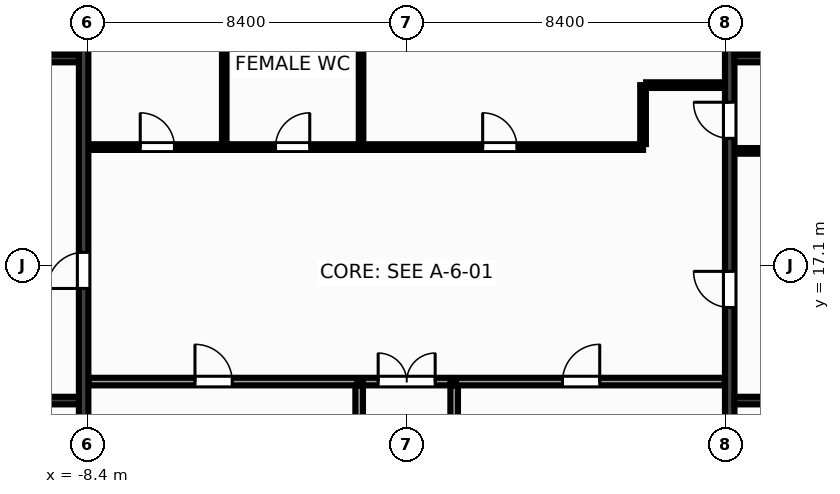
"""IFC4 building model, lengths in metres.
Left out: names, types, materials, properties, quantities, classifications, styles, units other than length and angle.
Written with IfcOpenShell. Run it as: python <this file> out.ifc"""

import sys

from ifc_helpers import new_model, si_unit, direction, frame, frame_2d, origin, place, context, subcontext, project, spatial, rectangle, extrude, source, transform, mapped, element, fill, save


model = new_model("IFC4")
c1 = context("Model", 3, precision=1e-05, world=origin(), true_north=direction((0.0, 1.0)))
c2 = subcontext(c1, "Body", "Model", "MODEL_VIEW")
j1 = project(units=[si_unit("LENGTHUNIT", "METRE"), si_unit("PLANEANGLEUNIT", "RADIAN")], contexts=[c1])
p1 = place(None, origin())
s1 = spatial("IfcSite", under=j1, at=p1, CompositionType="ELEMENT")
p2 = place(p1, origin())
s2 = spatial("IfcBuilding", under=s1, at=p2, CompositionType="ELEMENT")
p3 = place(p2, frame((0.0, 0.0, -11.0)))
s3 = spatial("IfcBuildingStorey", under=s2, at=p3, CompositionType="ELEMENT", Elevation=-11.0)
m1 = source(origin(), c2, "Body", "SweptSolid", [
    extrude(rectangle(XDim=12.8, YDim=0.25, at=frame_2d((6.4, 0.0))), origin(), (0.0, 0.0, 1.0), 5.5),
])
p4 = place(p3, frame((-8.5, 10.6, 0.0), z_axis=(0.0, 0.0, 1.0), x_axis=(0.0, 1.0, 0.0)))
e1 = element("IfcWall", 1, at=p4, inside=s3, PredefinedType="SHEAR", context=c2, shape_type="MappedRepresentation", body=[
    mapped(m1, transform((0.0, 0.0, 0.0), x_axis=(1.0, 0.0, 0.0), y_axis=(0.0, 1.0, 0.0), z_axis=(0.0, 0.0, 1.0), scale=1.0)),
])
p5 = place(p4, frame((5.9, 0.0, 0.0)))
e2 = element("IfcOpeningElement", 2, at=p5, cuts=e1, PredefinedType="OPENING", context=c2, shape_type="SweptSolid", body=[
    extrude(rectangle(XDim=0.95, YDim=2.15, at=frame_2d((0.475, 1.075))), frame((0.0, 0.137, 0.0), z_axis=(0.0, -1.0, 0.0), x_axis=(1.0, 0.0, 0.0)), (0.0, 0.0, 1.0), 0.274),
])
p6 = place(p3, frame((8.5, 10.6, 0.0), z_axis=(0.0, 0.0, 1.0), x_axis=(0.0, 1.0, 0.0)))
e3 = element("IfcWall", 3, at=p6, inside=s3, PredefinedType="SHEAR", context=c2, shape_type="MappedRepresentation", body=[
    mapped(m1, transform((0.0, 0.0, 0.0), x_axis=(1.0, 0.0, 0.0), y_axis=(0.0, 1.0, 0.0), z_axis=(0.0, 0.0, 1.0), scale=1.0)),
])
p7 = place(p6, frame((5.4, 0.0, 0.0)))
e4 = element("IfcOpeningElement", 4, at=p7, cuts=e3, PredefinedType="OPENING", context=c2, shape_type="SweptSolid", body=[
    extrude(rectangle(XDim=0.95, YDim=2.15, at=frame_2d((0.475, 1.075))), frame((0.0, 0.137, 0.0), z_axis=(0.0, -1.0, 0.0), x_axis=(1.0, 0.0, 0.0)), (0.0, 0.0, 1.0), 0.274),
])
p8 = place(p6, frame((9.85, 0.0, 0.0)))
e5 = element("IfcOpeningElement", 5, at=p8, cuts=e3, PredefinedType="OPENING", context=c2, shape_type="SweptSolid", body=[
    extrude(rectangle(XDim=0.95, YDim=2.15, at=frame_2d((0.475, 1.075))), frame((0.0, 0.137, 0.0), z_axis=(0.0, -1.0, 0.0), x_axis=(1.0, 0.0, 0.0)), (0.0, 0.0, 1.0), 0.274),
])
m2 = source(origin(), c2, "Body", "SweptSolid", [
    extrude(rectangle(XDim=2.825, YDim=0.2, at=frame_2d((1.413, 0.0))), origin(), (0.0, 0.0, 1.0), 5.5),
])
for number, where, z_axis, x_axis in (
    (6, (-11.45, 13.55, 0.0), (0.0, 0.0, 1.0), (1.0, 0.0, 0.0)),
    (7, (8.625, 13.55, 0.0), (0.0, 0.0, 1.0), (1.0, 0.0, 0.0)),
):
    element("IfcWall", number, at=place(p3, frame(where, z_axis=z_axis, x_axis=x_axis)), inside=s3, PredefinedType="SHEAR", context=c2, shape_type="MappedRepresentation", body=[
        mapped(m2, transform((0.0, 0.0, 0.0), x_axis=(1.0, 0.0, 0.0), y_axis=(0.0, 1.0, 0.0), z_axis=(0.0, 0.0, 1.0), scale=1.0)),
    ])
m3 = source(origin(), c2, "Body", "SweptSolid", [
    extrude(rectangle(XDim=3.02, YDim=0.2, at=frame_2d((1.51, 0.0))), origin(), (0.0, 0.0, 1.0), 5.5),
])
for number, where, z_axis, x_axis in (
    (8, (-11.645, 22.55, 0.0), (0.0, 0.0, 1.0), (1.0, 0.0, 0.0)),
    (9, (8.625, 22.55, 0.0), (0.0, 0.0, 1.0), (1.0, 0.0, 0.0)),
):
    element("IfcWall", number, at=place(p3, frame(where, z_axis=z_axis, x_axis=x_axis)), inside=s3, PredefinedType="SHEAR", context=c2, shape_type="MappedRepresentation", body=[
        mapped(m3, transform((0.0, 0.0, 0.0), x_axis=(1.0, 0.0, 0.0), y_axis=(0.0, 1.0, 0.0), z_axis=(0.0, 0.0, 1.0), scale=1.0)),
    ])
m4 = source(origin(), c2, "Body", "SweptSolid", [
    extrude(rectangle(XDim=3.01, YDim=0.15, at=frame_2d((1.505, 0.0))), origin(), (0.0, 0.0, 1.0), 5.15),
])
p9 = place(p3, frame((8.63, 20.12, 0.0), z_axis=(0.0, 0.0, 1.0), x_axis=(1.0, 0.0, 0.0)))
e10 = element("IfcWall", 10, at=p9, inside=s3, PredefinedType="PARTITIONING", context=c2, shape_type="MappedRepresentation", body=[
    mapped(m4, transform((0.0, 0.0, 0.0), x_axis=(1.0, 0.0, 0.0), y_axis=(0.0, 1.0, 0.0), z_axis=(0.0, 0.0, 1.0), scale=1.0)),
])
m5 = source(origin(), c2, "Body", "SweptSolid", [
    extrude(rectangle(XDim=7.07, YDim=0.2, at=frame_2d((3.535, 0.0))), origin(), (0.0, 0.0, 1.0), 5.15),
])
p10 = place(p3, frame((-8.37, 14.05, 0.0), z_axis=(0.0, 0.0, 1.0), x_axis=(1.0, 0.0, 0.0)))
e11 = element("IfcWall", 11, at=p10, inside=s3, PredefinedType="PARTITIONING", context=c2, shape_type="MappedRepresentation", body=[
    mapped(m5, transform((0.0, 0.0, 0.0), x_axis=(1.0, 0.0, 0.0), y_axis=(0.0, 1.0, 0.0), z_axis=(0.0, 0.0, 1.0), scale=1.0)),
])
p11 = place(p10, frame((2.8, 0.0, 0.0)))
e12 = element("IfcOpeningElement", 12, at=p11, cuts=e11, PredefinedType="OPENING", context=c2, shape_type="SweptSolid", body=[
    extrude(rectangle(XDim=0.98, YDim=2.15, at=frame_2d((0.49, 1.075))), frame((0.0, 0.112, 0.0), z_axis=(0.0, -1.0, 0.0), x_axis=(1.0, 0.0, 0.0)), (0.0, 0.0, 1.0), 0.224),
])
p12 = place(p3, frame((1.3, 14.05, 0.0), z_axis=(0.0, 0.0, 1.0), x_axis=(1.0, 0.0, 0.0)))
e13 = element("IfcWall", 13, at=p12, inside=s3, PredefinedType="PARTITIONING", context=c2, shape_type="MappedRepresentation", body=[
    mapped(m5, transform((0.0, 0.0, 0.0), x_axis=(1.0, 0.0, 0.0), y_axis=(0.0, 1.0, 0.0), z_axis=(0.0, 0.0, 1.0), scale=1.0)),
])
p13 = place(p12, frame((2.8, 0.0, 0.0)))
e14 = element("IfcOpeningElement", 14, at=p13, cuts=e13, PredefinedType="OPENING", context=c2, shape_type="SweptSolid", body=[
    extrude(rectangle(XDim=0.98, YDim=2.15, at=frame_2d((0.49, 1.075))), frame((0.0, 0.112, 0.0), z_axis=(0.0, -1.0, 0.0), x_axis=(1.0, 0.0, 0.0)), (0.0, 0.0, 1.0), 0.224),
])
m6 = source(origin(), c2, "Body", "SweptSolid", [
    extrude(rectangle(XDim=3.34, YDim=0.2, at=frame_2d((1.67, 0.0))), origin(), (0.0, 0.0, 1.0), 5.15),
])
for number, where, z_axis, x_axis in (
    (15, (-1.25, 10.6, 0.0), (0.0, 0.0, 1.0), (0.0, 1.0, 0.0)),
    (16, (1.25, 10.6, 0.0), (0.0, 0.0, 1.0), (0.0, 1.0, 0.0)),
):
    element("IfcWall", number, at=place(p3, frame(where, z_axis=z_axis, x_axis=x_axis)), inside=s3, PredefinedType="PARTITIONING", context=c2, shape_type="MappedRepresentation", body=[
        mapped(m6, transform((0.0, 0.0, 0.0), x_axis=(1.0, 0.0, 0.0), y_axis=(0.0, 1.0, 0.0), z_axis=(0.0, 0.0, 1.0), scale=1.0)),
    ])
m7 = source(origin(), c2, "Body", "SweptSolid", [
    extrude(rectangle(XDim=2.3, YDim=0.2, at=frame_2d((1.15, 0.0))), origin(), (0.0, 0.0, 1.0), 5.15),
])
p14 = place(p3, frame((-1.15, 14.05, 0.0), z_axis=(0.0, 0.0, 1.0), x_axis=(1.0, 0.0, 0.0)))
e17 = element("IfcWall", 17, at=p14, inside=s3, PredefinedType="PARTITIONING", context=c2, shape_type="MappedRepresentation", body=[
    mapped(m7, transform((0.0, 0.0, 0.0), x_axis=(1.0, 0.0, 0.0), y_axis=(0.0, 1.0, 0.0), z_axis=(0.0, 0.0, 1.0), scale=1.0)),
])
p15 = place(p14, frame((0.4, 0.0, 0.0)))
e18 = element("IfcOpeningElement", 18, at=p15, cuts=e17, PredefinedType="OPENING", context=c2, shape_type="SweptSolid", body=[
    extrude(rectangle(XDim=1.5, YDim=2.2, at=frame_2d((0.75, 1.1))), frame((0.0, 0.112, 0.0), z_axis=(0.0, -1.0, 0.0), x_axis=(1.0, 0.0, 0.0)), (0.0, 0.0, 1.0), 0.224),
])
m8 = source(origin(), c2, "Body", "SweptSolid", [
    extrude(rectangle(XDim=14.59, YDim=0.15, at=frame_2d((7.295, 0.0))), origin(), (0.0, 0.0, 1.0), 5.15),
])
p16 = place(p3, frame((-8.37, 20.22, 0.0), z_axis=(0.0, 0.0, 1.0), x_axis=(1.0, 0.0, 0.0)))
e19 = element("IfcWall", 19, at=p16, inside=s3, PredefinedType="PARTITIONING", context=c2, shape_type="MappedRepresentation", body=[
    mapped(m8, transform((0.0, 0.0, 0.0), x_axis=(1.0, 0.0, 0.0), y_axis=(0.0, 1.0, 0.0), z_axis=(0.0, 0.0, 1.0), scale=1.0)),
])
p17 = place(p16, frame((1.36, 0.0, 0.0)))
e20 = element("IfcOpeningElement", 20, at=p17, cuts=e19, PredefinedType="OPENING", context=c2, shape_type="SweptSolid", body=[
    extrude(rectangle(XDim=0.9, YDim=2.15, at=frame_2d((0.45, 1.075))), frame((0.0, 0.087, 0.0), z_axis=(0.0, -1.0, 0.0), x_axis=(1.0, 0.0, 0.0)), (0.0, 0.0, 1.0), 0.174),
])
p18 = place(p16, frame((4.92, 0.0, 0.0)))
e21 = element("IfcOpeningElement", 21, at=p18, cuts=e19, PredefinedType="OPENING", context=c2, shape_type="SweptSolid", body=[
    extrude(rectangle(XDim=0.9, YDim=2.15, at=frame_2d((0.45, 1.075))), frame((0.0, 0.087, 0.0), z_axis=(0.0, -1.0, 0.0), x_axis=(1.0, 0.0, 0.0)), (0.0, 0.0, 1.0), 0.174),
])
p19 = place(p16, frame((10.37, 0.0, 0.0)))
e22 = element("IfcOpeningElement", 22, at=p19, cuts=e19, PredefinedType="OPENING", context=c2, shape_type="SweptSolid", body=[
    extrude(rectangle(XDim=0.9, YDim=2.15, at=frame_2d((0.45, 1.075))), frame((0.0, 0.087, 0.0), z_axis=(0.0, -1.0, 0.0), x_axis=(1.0, 0.0, 0.0)), (0.0, 0.0, 1.0), 0.174),
])
m9 = source(origin(), c2, "Body", "SweptSolid", [
    extrude(rectangle(XDim=1.55, YDim=0.15, at=frame_2d((0.775, 0.0))), origin(), (0.0, 0.0, 1.0), 5.15),
])
p20 = place(p3, frame((6.22, 20.3, 0.0), z_axis=(0.0, 0.0, 1.0), x_axis=(0.0, 1.0, 0.0)))
e23 = element("IfcWall", 23, at=p20, inside=s3, PredefinedType="PARTITIONING", context=c2, shape_type="MappedRepresentation", body=[
    mapped(m9, transform((0.0, 0.0, 0.0), x_axis=(1.0, 0.0, 0.0), y_axis=(0.0, 1.0, 0.0), z_axis=(0.0, 0.0, 1.0), scale=1.0)),
])
m10 = source(origin(), c2, "Body", "SweptSolid", [
    extrude(rectangle(XDim=2.07, YDim=0.15, at=frame_2d((1.035, 0.0))), origin(), (0.0, 0.0, 1.0), 5.15),
])
p21 = place(p3, frame((6.3, 21.85, 0.0), z_axis=(0.0, 0.0, 1.0), x_axis=(1.0, 0.0, 0.0)))
e24 = element("IfcWall", 24, at=p21, inside=s3, PredefinedType="PARTITIONING", context=c2, shape_type="MappedRepresentation", body=[
    mapped(m10, transform((0.0, 0.0, 0.0), x_axis=(1.0, 0.0, 0.0), y_axis=(0.0, 1.0, 0.0), z_axis=(0.0, 0.0, 1.0), scale=1.0)),
])
m11 = source(origin(), c2, "Body", "SweptSolid", [
    extrude(rectangle(XDim=3.04, YDim=0.12, at=frame_2d((1.52, 0.0))), origin(), (0.0, 0.0, 1.0), 5.15),
])
for number, where, z_axis, x_axis in (
    (25, (-4.8, 20.32, 0.0), (0.0, 0.0, 1.0), (0.0, 1.0, 0.0)),
    (26, (-1.2, 20.32, 0.0), (0.0, 0.0, 1.0), (0.0, 1.0, 0.0)),
):
    element("IfcWall", number, at=place(p3, frame(where, z_axis=z_axis, x_axis=x_axis)), inside=s3, PredefinedType="PARTITIONING", context=c2, shape_type="MappedRepresentation", body=[
        mapped(m11, transform((0.0, 0.0, 0.0), x_axis=(1.0, 0.0, 0.0), y_axis=(0.0, 1.0, 0.0), z_axis=(0.0, 0.0, 1.0), scale=1.0)),
    ])
m12 = source(origin(), c2, "Body", "SweptSolid", [
    extrude(rectangle(XDim=0.95, YDim=2.15, at=frame_2d((0.475, 1.075))), frame((0.0, 0.025, 0.0), z_axis=(0.0, -1.0, 0.0), x_axis=(1.0, 0.0, 0.0)), (0.0, 0.0, 1.0), 0.05),
])
p22 = place(p5, origin())
e27 = element("IfcDoor", 27, at=p22, inside=s3, OperationType="SINGLE_SWING_LEFT", PredefinedType="DOOR", context=c2, shape_type="MappedRepresentation", body=[
    mapped(m12, transform((0.0, 0.0, 0.0), x_axis=(1.0, 0.0, 0.0), y_axis=(0.0, 1.0, 0.0), z_axis=(0.0, 0.0, 1.0), scale=1.0)),
])
fill(e2, e27)
p23 = place(p7, origin())
e28 = element("IfcDoor", 28, at=p23, inside=s3, OperationType="SINGLE_SWING_RIGHT", PredefinedType="DOOR", context=c2, shape_type="MappedRepresentation", body=[
    mapped(m12, transform((0.0, 0.0, 0.0), x_axis=(1.0, 0.0, 0.0), y_axis=(0.0, 1.0, 0.0), z_axis=(0.0, 0.0, 1.0), scale=1.0)),
])
fill(e4, e28)
m13 = source(origin(), c2, "Body", "SweptSolid", [
    extrude(rectangle(XDim=0.95, YDim=2.15, at=frame_2d((0.475, 1.075))), frame((0.0, 0.025, 0.0), z_axis=(0.0, -1.0, 0.0), x_axis=(1.0, 0.0, 0.0)), (0.0, 0.0, 1.0), 0.05),
])
p24 = place(p8, origin())
e29 = element("IfcDoor", 29, at=p24, inside=s3, OperationType="SINGLE_SWING_RIGHT", PredefinedType="DOOR", context=c2, shape_type="MappedRepresentation", body=[
    mapped(m13, transform((0.0, 0.0, 0.0), x_axis=(1.0, 0.0, 0.0), y_axis=(0.0, 1.0, 0.0), z_axis=(0.0, 0.0, 1.0), scale=1.0)),
])
fill(e5, e29)
m14 = source(origin(), c2, "Body", "SweptSolid", [
    extrude(rectangle(XDim=0.98, YDim=2.15, at=frame_2d((0.49, 1.075))), frame((0.0, 0.025, 0.0), z_axis=(0.0, -1.0, 0.0), x_axis=(1.0, 0.0, 0.0)), (0.0, 0.0, 1.0), 0.05),
])
p25 = place(p11, origin())
e30 = element("IfcDoor", 30, at=p25, inside=s3, OperationType="SINGLE_SWING_LEFT", PredefinedType="DOOR", context=c2, shape_type="MappedRepresentation", body=[
    mapped(m14, transform((0.0, 0.0, 0.0), x_axis=(1.0, 0.0, 0.0), y_axis=(0.0, 1.0, 0.0), z_axis=(0.0, 0.0, 1.0), scale=1.0)),
])
fill(e12, e30)
p26 = place(p13, origin())
e31 = element("IfcDoor", 31, at=p26, inside=s3, OperationType="SINGLE_SWING_RIGHT", PredefinedType="DOOR", context=c2, shape_type="MappedRepresentation", body=[
    mapped(m14, transform((0.0, 0.0, 0.0), x_axis=(1.0, 0.0, 0.0), y_axis=(0.0, 1.0, 0.0), z_axis=(0.0, 0.0, 1.0), scale=1.0)),
])
fill(e14, e31)
m15 = source(origin(), c2, "Body", "SweptSolid", [
    extrude(rectangle(XDim=1.5, YDim=2.2, at=frame_2d((0.75, 1.1))), frame((0.0, 0.025, 0.0), z_axis=(0.0, -1.0, 0.0), x_axis=(1.0, 0.0, 0.0)), (0.0, 0.0, 1.0), 0.05),
])
p27 = place(p15, origin())
e32 = element("IfcDoor", 32, at=p27, inside=s3, OperationType="DOUBLE_DOOR_SINGLE_SWING", PredefinedType="DOOR", context=c2, shape_type="MappedRepresentation", body=[
    mapped(m15, transform((0.0, 0.0, 0.0), x_axis=(1.0, 0.0, 0.0), y_axis=(0.0, 1.0, 0.0), z_axis=(0.0, 0.0, 1.0), scale=1.0)),
])
fill(e18, e32)
m16 = source(origin(), c2, "Body", "SweptSolid", [
    extrude(rectangle(XDim=0.9, YDim=2.15, at=frame_2d((0.45, 1.075))), frame((0.0, 0.025, 0.0), z_axis=(0.0, -1.0, 0.0), x_axis=(1.0, 0.0, 0.0)), (0.0, 0.0, 1.0), 0.05),
])
p28 = place(p17, origin())
e33 = element("IfcDoor", 33, at=p28, inside=s3, OperationType="SINGLE_SWING_LEFT", PredefinedType="DOOR", context=c2, shape_type="MappedRepresentation", body=[
    mapped(m16, transform((0.0, 0.0, 0.0), x_axis=(1.0, 0.0, 0.0), y_axis=(0.0, 1.0, 0.0), z_axis=(0.0, 0.0, 1.0), scale=1.0)),
])
fill(e20, e33)
p29 = place(p18, origin())
e34 = element("IfcDoor", 34, at=p29, inside=s3, OperationType="SINGLE_SWING_RIGHT", PredefinedType="DOOR", context=c2, shape_type="MappedRepresentation", body=[
    mapped(m16, transform((0.0, 0.0, 0.0), x_axis=(1.0, 0.0, 0.0), y_axis=(0.0, 1.0, 0.0), z_axis=(0.0, 0.0, 1.0), scale=1.0)),
])
fill(e21, e34)
p30 = place(p19, origin())
e35 = element("IfcDoor", 35, at=p30, inside=s3, OperationType="SINGLE_SWING_LEFT", PredefinedType="DOOR", context=c2, shape_type="MappedRepresentation", body=[
    mapped(m16, transform((0.0, 0.0, 0.0), x_axis=(1.0, 0.0, 0.0), y_axis=(0.0, 1.0, 0.0), z_axis=(0.0, 0.0, 1.0), scale=1.0)),
])
fill(e22, e35)
save(model, sys.argv[1])
